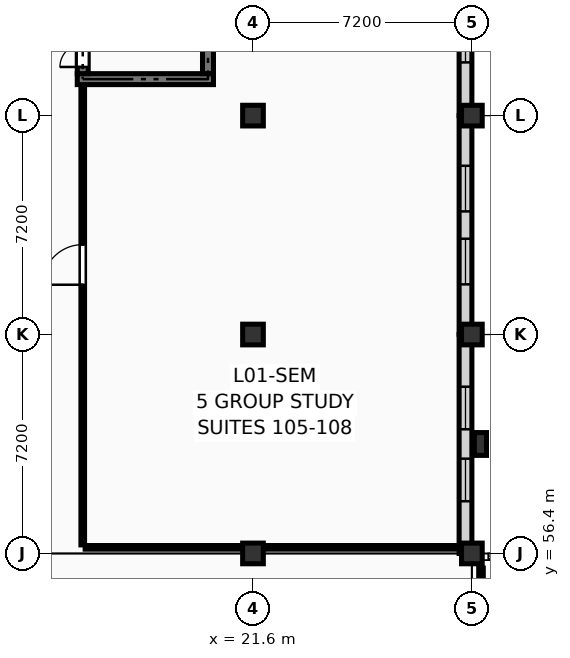
"""IFC4 building model, lengths in metres.
Left out: names, types, materials, properties, quantities, classifications, styles, units other than length and angle.
Written with IfcOpenShell. Run it as: python <this file> out.ifc"""

import sys

from ifc_helpers import new_model, si_unit, direction, frame, frame_2d, origin, origin_2d, place, context, subcontext, project, spatial, rectangle, extrude, element, fill, save


model = new_model("IFC4")
c1 = context("Model", 3, precision=1e-05, world=origin(), true_north=direction((0.0, 1.0)))
c2 = subcontext(c1, "Body", "Model", "MODEL_VIEW")
j1 = project(units=[si_unit("LENGTHUNIT", "METRE"), si_unit("PLANEANGLEUNIT", "RADIAN")], contexts=[c1])
p1 = place(None, origin())
s1 = spatial("IfcSite", under=j1, at=p1, CompositionType="ELEMENT")
p2 = place(p1, origin())
s2 = spatial("IfcBuilding", under=s1, at=p2, CompositionType="ELEMENT")
p3 = place(p2, frame((0.0, 0.0, 4.5)))
s3 = spatial("IfcBuildingStorey", under=s2, at=p3, CompositionType="ELEMENT", Elevation=4.5)
for number, where, z_axis, x_axis in (
    (1, (21.6, 56.4, 0.0), (0.0, 0.0, 1.0), (1.0, 0.0, 0.0)),
    (2, (21.6, 63.6, 0.0), (0.0, 0.0, 1.0), (1.0, 0.0, 0.0)),
    (3, (21.6, 70.8, 0.0), (0.0, 0.0, 1.0), (1.0, 0.0, 0.0)),
    (4, (28.8, 56.4, 0.0), (0.0, 0.0, 1.0), (1.0, 0.0, 0.0)),
    (5, (28.8, 63.6, 0.0), (0.0, 0.0, 1.0), (1.0, 0.0, 0.0)),
    (6, (28.8, 70.8, 0.0), (0.0, 0.0, 1.0), (1.0, 0.0, 0.0)),
):
    element("IfcColumn", number, at=place(p3, frame(where, z_axis=z_axis, x_axis=x_axis)), inside=s3, PredefinedType="COLUMN", context=c2, shape_type="SweptSolid", body=[
        extrude(rectangle(XDim=0.68, YDim=0.68, at=origin_2d()), origin(), (0.0, 0.0, 1.0), 4.05),
    ])
p4 = place(p3, frame((29.08, 60.0, 0.0), z_axis=(0.0, 0.0, 1.0), x_axis=(1.0, 0.0, 0.0)))
e7 = element("IfcColumn", 7, at=p4, inside=s3, PredefinedType="PILASTER", context=c2, shape_type="SweptSolid", body=[
    extrude(rectangle(XDim=0.4, YDim=0.75, at=origin_2d()), origin(), (0.0, 0.0, 1.0), 4.05),
])
p5 = place(p3, frame((28.59, 70.8, 0.0), z_axis=(0.0, 0.0, 1.0), x_axis=(0.0, 1.0, 0.0)))
e8 = element("IfcWall", 8, at=p5, inside=s3, PredefinedType="SOLIDWALL", context=c2, shape_type="SweptSolid", body=[
    extrude(rectangle(XDim=7.2, YDim=0.42, at=frame_2d((3.6, 0.0))), origin(), (0.0, 0.0, 1.0), 3.16),
])
p6 = place(p5, frame((1.75, 0.0, 0.45)))
e9 = element("IfcOpeningElement", 9, at=p6, cuts=e8, PredefinedType="OPENING", context=c2, shape_type="SweptSolid", body=[
    extrude(rectangle(XDim=1.35, YDim=2.45, at=frame_2d((0.675, 1.225))), frame((0.0, 0.222, 0.0), z_axis=(0.0, -1.0, 0.0), x_axis=(1.0, 0.0, 0.0)), (0.0, 0.0, 1.0), 0.444),
])
p7 = place(p5, frame((4.1, 0.0, 0.45)))
e10 = element("IfcOpeningElement", 10, at=p7, cuts=e8, PredefinedType="OPENING", context=c2, shape_type="SweptSolid", body=[
    extrude(rectangle(XDim=1.35, YDim=2.45, at=frame_2d((0.675, 1.225))), frame((0.0, 0.222, 0.0), z_axis=(0.0, -1.0, 0.0), x_axis=(1.0, 0.0, 0.0)), (0.0, 0.0, 1.0), 0.444),
])
p8 = place(p3, frame((28.59, 63.6, 0.0), z_axis=(0.0, 0.0, 1.0), x_axis=(0.0, 1.0, 0.0)))
e11 = element("IfcWall", 11, at=p8, inside=s3, PredefinedType="SOLIDWALL", context=c2, shape_type="SweptSolid", body=[
    extrude(rectangle(XDim=7.2, YDim=0.42, at=frame_2d((3.6, 0.0))), origin(), (0.0, 0.0, 1.0), 3.16),
])
p9 = place(p8, frame((1.65, 0.0, 0.45)))
e12 = element("IfcOpeningElement", 12, at=p9, cuts=e11, PredefinedType="OPENING", context=c2, shape_type="SweptSolid", body=[
    extrude(rectangle(XDim=1.5, YDim=2.4, at=frame_2d((0.75, 1.2))), frame((0.0, 0.222, 0.0), z_axis=(0.0, -1.0, 0.0), x_axis=(1.0, 0.0, 0.0)), (0.0, 0.0, 1.0), 0.444),
])
p10 = place(p8, frame((4.05, 0.0, 0.45)))
e13 = element("IfcOpeningElement", 13, at=p10, cuts=e11, PredefinedType="OPENING", context=c2, shape_type="SweptSolid", body=[
    extrude(rectangle(XDim=1.5, YDim=2.4, at=frame_2d((0.75, 1.2))), frame((0.0, 0.222, 0.0), z_axis=(0.0, -1.0, 0.0), x_axis=(1.0, 0.0, 0.0)), (0.0, 0.0, 1.0), 0.444),
])
p11 = place(p3, frame((28.59, 56.4, 0.0), z_axis=(0.0, 0.0, 1.0), x_axis=(0.0, 1.0, 0.0)))
e14 = element("IfcWall", 14, at=p11, inside=s3, PredefinedType="SOLIDWALL", context=c2, shape_type="SweptSolid", body=[
    extrude(rectangle(XDim=7.2, YDim=0.42, at=frame_2d((3.6, 0.0))), origin(), (0.0, 0.0, 1.0), 3.16),
])
p12 = place(p11, frame((1.717, 0.0, 0.45)))
e15 = element("IfcOpeningElement", 15, at=p12, cuts=e14, PredefinedType="OPENING", context=c2, shape_type="SweptSolid", body=[
    extrude(rectangle(XDim=1.4, YDim=2.38, at=frame_2d((0.7, 1.19))), frame((0.0, 0.222, 0.0), z_axis=(0.0, -1.0, 0.0), x_axis=(1.0, 0.0, 0.0)), (0.0, 0.0, 1.0), 0.444),
])
p13 = place(p11, frame((4.083, 0.0, 0.45)))
e16 = element("IfcOpeningElement", 16, at=p13, cuts=e14, PredefinedType="OPENING", context=c2, shape_type="SweptSolid", body=[
    extrude(rectangle(XDim=1.4, YDim=2.38, at=frame_2d((0.7, 1.19))), frame((0.0, 0.222, 0.0), z_axis=(0.0, -1.0, 0.0), x_axis=(1.0, 0.0, 0.0)), (0.0, 0.0, 1.0), 0.444),
])
p14 = place(p3, frame((15.82, 72.0, 0.0), z_axis=(0.0, 0.0, 1.0), x_axis=(1.0, 0.0, 0.0)))
e17 = element("IfcWall", 17, at=p14, inside=s3, PredefinedType="SHEAR", context=c2, shape_type="SweptSolid", body=[
    extrude(rectangle(XDim=4.48, YDim=0.36, at=frame_2d((2.24, 0.0))), origin(), (0.0, 0.0, 1.0), 3.79),
])
p15 = place(p3, frame((16.0, 72.18, 0.0), z_axis=(0.0, 0.0, 1.0), x_axis=(0.0, 1.0, 0.0)))
e18 = element("IfcWall", 18, at=p15, inside=s3, PredefinedType="SHEAR", context=c2, shape_type="SweptSolid", body=[
    extrude(rectangle(XDim=7.24, YDim=0.36, at=frame_2d((3.62, 0.0))), origin(), (0.0, 0.0, 1.0), 3.79),
])
p16 = place(p15, frame((0.22, 0.0, 0.0)))
e19 = element("IfcOpeningElement", 19, at=p16, cuts=e18, PredefinedType="OPENING", context=c2, shape_type="SweptSolid", body=[
    extrude(rectangle(XDim=1.5, YDim=2.2, at=frame_2d((0.75, 1.1))), frame((0.0, 0.192, 0.0), z_axis=(0.0, -1.0, 0.0), x_axis=(1.0, 0.0, 0.0)), (0.0, 0.0, 1.0), 0.384),
])
p17 = place(p3, frame((20.12, 72.18, 0.0), z_axis=(0.0, 0.0, 1.0), x_axis=(0.0, 1.0, 0.0)))
e20 = element("IfcWall", 20, at=p17, inside=s3, PredefinedType="SHEAR", context=c2, shape_type="SweptSolid", body=[
    extrude(rectangle(XDim=7.24, YDim=0.36, at=frame_2d((3.62, 0.0))), origin(), (0.0, 0.0, 1.0), 3.79),
])
p18 = place(p3, frame((29.1, 45.28, 0.0), z_axis=(0.0, 0.0, 1.0), x_axis=(0.0, 1.0, 0.0)))
e21 = element("IfcWall", 21, at=p18, inside=s3, PredefinedType="PARTITIONING", context=c2, shape_type="SweptSolid", body=[
    extrude(rectangle(XDim=10.64, YDim=0.15, at=frame_2d((5.32, 0.0))), origin(), (0.0, 0.0, 1.0), 2.925),
])
p19 = place(p3, frame((16.0, 56.68, 0.0), z_axis=(0.0, 0.0, 1.0), x_axis=(0.0, 1.0, 0.0)))
e22 = element("IfcWall", 22, at=p19, inside=s3, PredefinedType="PARTITIONING", context=c2, shape_type="SweptSolid", body=[
    extrude(rectangle(XDim=15.1, YDim=0.12, at=frame_2d((7.55, 0.0))), origin(), (0.0, 0.0, 1.0), 3.775),
])
p20 = place(p19, frame((8.558, 0.0, 0.0)))
e23 = element("IfcOpeningElement", 23, at=p20, cuts=e22, PredefinedType="OPENING", context=c2, shape_type="SweptSolid", body=[
    extrude(rectangle(XDim=1.32, YDim=2.2, at=frame_2d((0.66, 1.1))), frame((0.0, 0.072, 0.0), z_axis=(0.0, -1.0, 0.0), x_axis=(1.0, 0.0, 0.0)), (0.0, 0.0, 1.0), 0.144),
])
p21 = place(p3, frame((16.08, 56.6, 0.0), z_axis=(0.0, 0.0, 1.0), x_axis=(1.0, 0.0, 0.0)))
e24 = element("IfcWall", 24, at=p21, inside=s3, PredefinedType="PARTITIONING", context=c2, shape_type="SweptSolid", body=[
    extrude(rectangle(XDim=12.24, YDim=0.12, at=frame_2d((6.12, 0.0))), origin(), (0.0, 0.0, 1.0), 3.025),
])
p22 = place(p6, origin())
e25 = element("IfcWindow", 25, at=p22, inside=s3, PartitioningType="SINGLE_PANEL", PredefinedType="WINDOW", context=c2, shape_type="SweptSolid", body=[
    extrude(rectangle(XDim=1.35, YDim=2.45, at=frame_2d((0.675, 1.225))), frame((0.0, 0.03, 0.0), z_axis=(0.0, -1.0, 0.0), x_axis=(1.0, 0.0, 0.0)), (0.0, 0.0, 1.0), 0.06),
])
fill(e9, e25)
p23 = place(p9, origin())
e26 = element("IfcWindow", 26, at=p23, inside=s3, PartitioningType="SINGLE_PANEL", PredefinedType="WINDOW", context=c2, shape_type="SweptSolid", body=[
    extrude(rectangle(XDim=1.5, YDim=2.4, at=frame_2d((0.75, 1.2))), frame((0.0, 0.03, 0.0), z_axis=(0.0, -1.0, 0.0), x_axis=(1.0, 0.0, 0.0)), (0.0, 0.0, 1.0), 0.06),
])
fill(e12, e26)
p24 = place(p10, origin())
e27 = element("IfcWindow", 27, at=p24, inside=s3, PartitioningType="SINGLE_PANEL", PredefinedType="WINDOW", context=c2, shape_type="SweptSolid", body=[
    extrude(rectangle(XDim=1.5, YDim=2.4, at=frame_2d((0.75, 1.2))), frame((0.0, 0.03, 0.0), z_axis=(0.0, -1.0, 0.0), x_axis=(1.0, 0.0, 0.0)), (0.0, 0.0, 1.0), 0.06),
])
fill(e13, e27)
p25 = place(p12, origin())
e28 = element("IfcWindow", 28, at=p25, inside=s3, PartitioningType="SINGLE_PANEL", PredefinedType="WINDOW", context=c2, shape_type="SweptSolid", body=[
    extrude(rectangle(XDim=1.4, YDim=2.38, at=frame_2d((0.7, 1.19))), frame((0.0, 0.03, 0.0), z_axis=(0.0, -1.0, 0.0), x_axis=(1.0, 0.0, 0.0)), (0.0, 0.0, 1.0), 0.06),
])
fill(e15, e28)
p26 = place(p13, origin())
e29 = element("IfcWindow", 29, at=p26, inside=s3, PartitioningType="SINGLE_PANEL", PredefinedType="WINDOW", context=c2, shape_type="SweptSolid", body=[
    extrude(rectangle(XDim=1.4, YDim=2.38, at=frame_2d((0.7, 1.19))), frame((0.0, 0.03, 0.0), z_axis=(0.0, -1.0, 0.0), x_axis=(1.0, 0.0, 0.0)), (0.0, 0.0, 1.0), 0.06),
])
fill(e16, e29)
p27 = place(p16, origin())
e30 = element("IfcDoor", 30, at=p27, inside=s3, OperationType="DOUBLE_DOOR_SINGLE_SWING", PredefinedType="DOOR", context=c2, shape_type="SweptSolid", body=[
    extrude(rectangle(XDim=1.5, YDim=2.2, at=frame_2d((0.75, 1.1))), frame((0.0, 0.025, 0.0), z_axis=(0.0, -1.0, 0.0), x_axis=(1.0, 0.0, 0.0)), (0.0, 0.0, 1.0), 0.05),
])
fill(e19, e30)
p28 = place(p20, origin())
e31 = element("IfcDoor", 31, at=p28, inside=s3, OperationType="SINGLE_SWING_LEFT", PredefinedType="DOOR", context=c2, shape_type="SweptSolid", body=[
    extrude(rectangle(XDim=1.32, YDim=2.2, at=frame_2d((0.66, 1.1))), frame((0.0, 0.025, 0.0), z_axis=(0.0, -1.0, 0.0), x_axis=(1.0, 0.0, 0.0)), (0.0, 0.0, 1.0), 0.05),
])
fill(e23, e31)
save(model, sys.argv[1])
